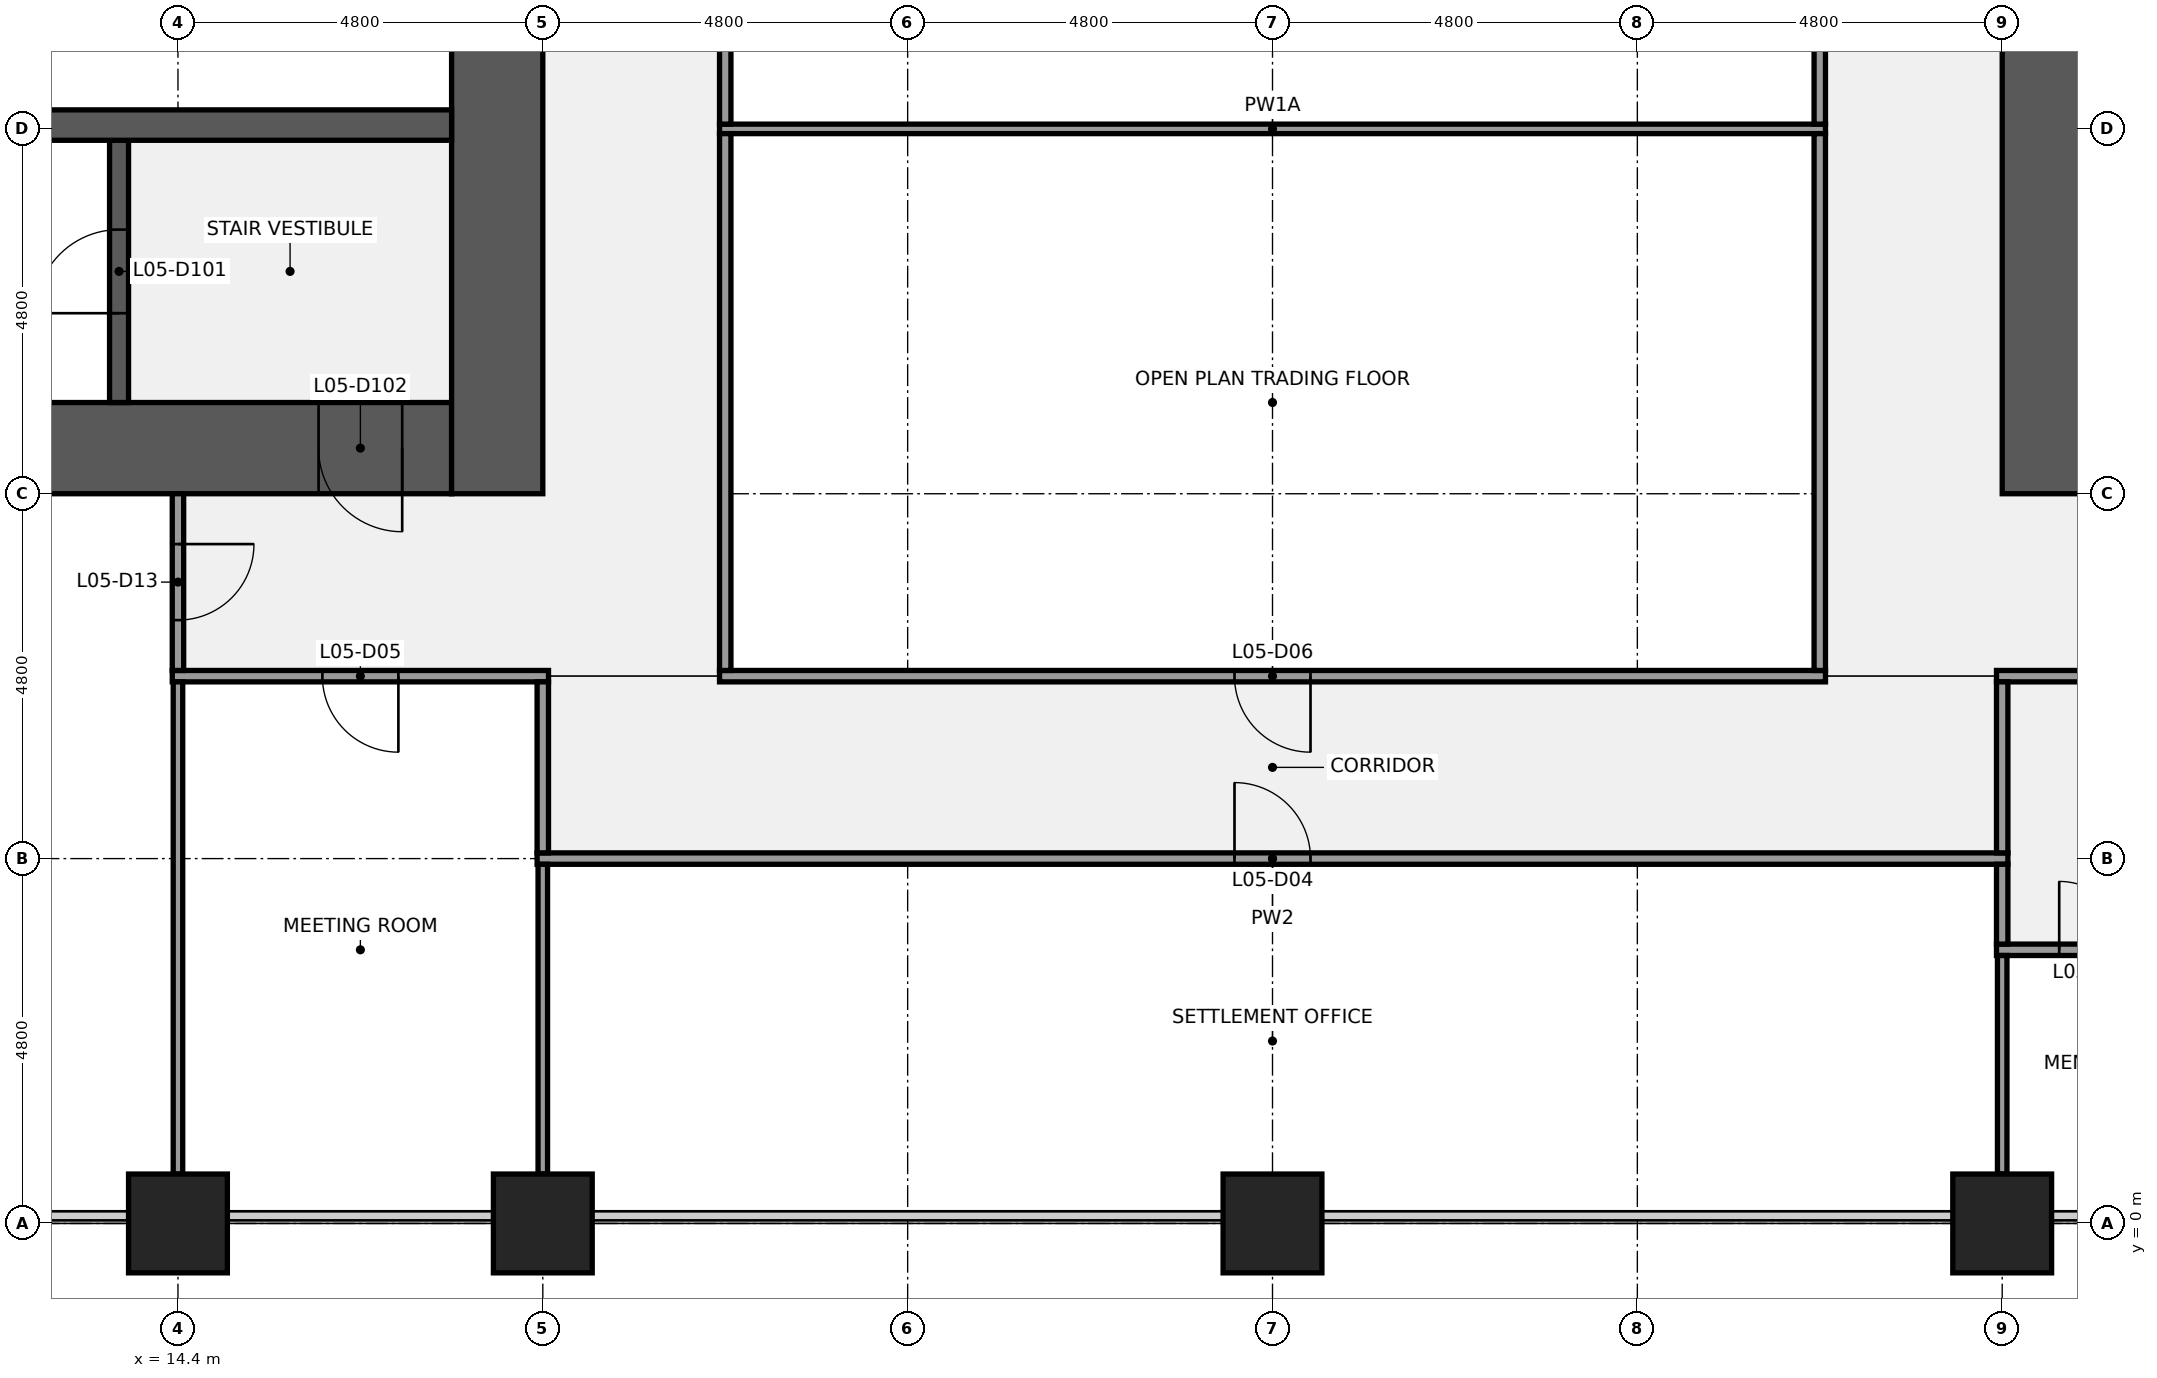
"""IFC4 building model, lengths in metres.
Left out: names, types, materials, properties, quantities, classifications, styles, units other than length and angle.
Written with IfcOpenShell. Run it as: python <this file> out.ifc"""

import sys

from ifc_helpers import new_model, si_unit, direction, frame, frame_2d, origin, origin_2d, place, context, subcontext, project, spatial, rectangle, extrude, element, fill, save


model = new_model("IFC4")
c1 = context("Model", 3, precision=1e-05, world=origin(), true_north=direction((0.0, 1.0)))
c2 = subcontext(c1, "Body", "Model", "MODEL_VIEW")
j1 = project(units=[si_unit("LENGTHUNIT", "METRE"), si_unit("PLANEANGLEUNIT", "RADIAN")], contexts=[c1])
p1 = place(None, origin())
s1 = spatial("IfcSite", under=j1, at=p1, CompositionType="ELEMENT")
p2 = place(p1, origin())
s2 = spatial("IfcBuilding", under=s1, at=p2, CompositionType="ELEMENT")
p3 = place(p2, frame((0.0, 0.0, 30.2)))
s3 = spatial("IfcBuildingStorey", under=s2, at=p3, CompositionType="ELEMENT", Elevation=30.2)
for number, where, z_axis, x_axis in (
    (1, (14.4, 0.0, 0.0), (0.0, 0.0, 1.0), (1.0, 0.0, 0.0)),
    (2, (19.2, 0.0, 0.0), (0.0, 0.0, 1.0), (1.0, 0.0, 0.0)),
    (3, (28.8, 0.0, 0.0), (0.0, 0.0, 1.0), (1.0, 0.0, 0.0)),
    (4, (38.4, 0.0, 0.0), (0.0, 0.0, 1.0), (1.0, 0.0, 0.0)),
):
    element("IfcColumn", number, at=place(p3, frame(where, z_axis=z_axis, x_axis=x_axis)), inside=s3, PredefinedType="COLUMN", context=c2, shape_type="SweptSolid", body=[
        extrude(rectangle(XDim=1.3, YDim=1.3, at=origin_2d()), origin(), (0.0, 0.0, 1.0), 4.4),
    ])
p4 = place(p3, frame((18.0, 10.2, 0.0), z_axis=(0.0, 0.0, 1.0), x_axis=(-1.0, 0.0, 0.0)))
e5 = element("IfcWall", 5, at=p4, inside=s3, PredefinedType="SHEAR", context=c2, shape_type="SweptSolid", body=[
    extrude(rectangle(XDim=13.2, YDim=1.2, at=frame_2d((6.6, 0.0))), origin(), (0.0, 0.0, 1.0), 4.24),
])
p5 = place(p4, frame((0.65, 0.0, 0.0)))
e6 = element("IfcOpeningElement", 6, at=p5, cuts=e5, PredefinedType="OPENING", context=c2, shape_type="SweptSolid", body=[
    extrude(rectangle(XDim=1.1, YDim=2.1, at=frame_2d((0.55, 1.05))), frame((0.0, 0.61, 0.0), z_axis=(0.0, -1.0, 0.0), x_axis=(1.0, 0.0, 0.0)), (0.0, 0.0, 1.0), 1.22),
])
p6 = place(p3, frame((18.6, 38.4, 0.0), z_axis=(0.0, 0.0, 1.0), x_axis=(0.0, -1.0, 0.0)))
e7 = element("IfcWall", 7, at=p6, inside=s3, PredefinedType="SHEAR", context=c2, shape_type="SweptSolid", body=[
    extrude(rectangle(XDim=28.8, YDim=1.2, at=frame_2d((14.4, 0.0))), origin(), (0.0, 0.0, 1.0), 4.24),
])
p7 = place(p6, frame((18.3, 0.0, 0.0)))
e8 = element("IfcOpeningElement", 8, at=p7, cuts=e7, PredefinedType="OPENING", context=c2, shape_type="SweptSolid", body=[
    extrude(rectangle(XDim=1.8, YDim=2.1, at=frame_2d((0.9, 1.05))), frame((0.0, 0.61, 0.0), z_axis=(0.0, -1.0, 0.0), x_axis=(1.0, 0.0, 0.0)), (0.0, 0.0, 1.0), 1.22),
])
p8 = place(p6, frame((8.7, 0.0, 0.0)))
e9 = element("IfcOpeningElement", 9, at=p8, cuts=e7, PredefinedType="OPENING", context=c2, shape_type="SweptSolid", body=[
    extrude(rectangle(XDim=1.8, YDim=2.1, at=frame_2d((0.9, 1.05))), frame((0.0, 0.61, 0.0), z_axis=(0.0, -1.0, 0.0), x_axis=(1.0, 0.0, 0.0)), (0.0, 0.0, 1.0), 1.22),
])
p9 = place(p3, frame((13.625, 10.8, 0.0), z_axis=(0.0, 0.0, 1.0), x_axis=(0.0, 1.0, 0.0)))
e10 = element("IfcWall", 10, at=p9, inside=s3, PredefinedType="SHEAR", context=c2, shape_type="SweptSolid", body=[
    extrude(rectangle(XDim=3.45, YDim=0.25, at=frame_2d((1.725, 0.0))), origin(), (0.0, 0.0, 1.0), 4.24),
])
p10 = place(p9, frame((1.175, 0.0, 0.0)))
e11 = element("IfcOpeningElement", 11, at=p10, cuts=e10, PredefinedType="OPENING", context=c2, shape_type="SweptSolid", body=[
    extrude(rectangle(XDim=1.1, YDim=2.1, at=frame_2d((0.55, 1.05))), frame((0.0, 0.135, 0.0), z_axis=(0.0, -1.0, 0.0), x_axis=(1.0, 0.0, 0.0)), (0.0, 0.0, 1.0), 0.27),
])
p11 = place(p3, frame((1.2, 14.45, 0.0), z_axis=(0.0, 0.0, 1.0), x_axis=(1.0, 0.0, 0.0)))
e12 = element("IfcWall", 12, at=p11, inside=s3, PredefinedType="SHEAR", context=c2, shape_type="SweptSolid", body=[
    extrude(rectangle(XDim=16.8, YDim=0.4, at=frame_2d((8.4, 0.0))), origin(), (0.0, 0.0, 1.0), 4.24),
])
p12 = place(p3, frame((39.0, 9.6, 0.0), z_axis=(0.0, 0.0, 1.0), x_axis=(0.0, 1.0, 0.0)))
e13 = element("IfcWall", 13, at=p12, inside=s3, PredefinedType="SHEAR", context=c2, shape_type="SweptSolid", body=[
    extrude(rectangle(XDim=28.8, YDim=1.2, at=frame_2d((14.4, 0.0))), origin(), (0.0, 0.0, 1.0), 4.24),
])
p13 = place(p12, frame((8.7, 0.0, 0.0)))
e14 = element("IfcOpeningElement", 14, at=p13, cuts=e13, PredefinedType="OPENING", context=c2, shape_type="SweptSolid", body=[
    extrude(rectangle(XDim=1.8, YDim=2.1, at=frame_2d((0.9, 1.05))), frame((0.0, 0.61, 0.0), z_axis=(0.0, -1.0, 0.0), x_axis=(1.0, 0.0, 0.0)), (0.0, 0.0, 1.0), 1.22),
])
p14 = place(p12, frame((18.3, 0.0, 0.0)))
e15 = element("IfcOpeningElement", 15, at=p14, cuts=e13, PredefinedType="OPENING", context=c2, shape_type="SweptSolid", body=[
    extrude(rectangle(XDim=1.8, YDim=2.1, at=frame_2d((0.9, 1.05))), frame((0.0, 0.61, 0.0), z_axis=(0.0, -1.0, 0.0), x_axis=(1.0, 0.0, 0.0)), (0.0, 0.0, 1.0), 1.22),
])
p15 = place(p3, frame((38.325, 3.6, 0.0), z_axis=(0.0, 0.0, 1.0), x_axis=(1.0, 0.0, 0.0)))
e16 = element("IfcWall", 16, at=p15, inside=s3, PredefinedType="PARTITIONING", context=c2, shape_type="SweptSolid", body=[
    extrude(rectangle(XDim=7.35, YDim=0.15, at=frame_2d((3.675, 0.0))), origin(), (0.0, 0.0, 1.0), 3.25),
])
p16 = place(p15, frame((0.825, 0.0, 0.0)))
e17 = element("IfcOpeningElement", 17, at=p16, cuts=e16, PredefinedType="OPENING", context=c2, shape_type="SweptSolid", body=[
    extrude(rectangle(XDim=0.9, YDim=2.1, at=frame_2d((0.45, 1.05))), frame((0.0, 0.085, 0.0), z_axis=(0.0, -1.0, 0.0), x_axis=(1.0, 0.0, 0.0)), (0.0, 0.0, 1.0), 0.17),
])
p17 = place(p15, frame((3.225, 0.0, 0.0)))
e18 = element("IfcOpeningElement", 18, at=p17, cuts=e16, PredefinedType="OPENING", context=c2, shape_type="SweptSolid", body=[
    extrude(rectangle(XDim=0.9, YDim=2.1, at=frame_2d((0.45, 1.05))), frame((0.0, 0.085, 0.0), z_axis=(0.0, -1.0, 0.0), x_axis=(1.0, 0.0, 0.0)), (0.0, 0.0, 1.0), 0.17),
])
p18 = place(p15, frame((5.475, 0.0, 0.0)))
e19 = element("IfcOpeningElement", 19, at=p18, cuts=e16, PredefinedType="OPENING", context=c2, shape_type="SweptSolid", body=[
    extrude(rectangle(XDim=1.2, YDim=2.1, at=frame_2d((0.6, 1.05))), frame((0.0, 0.085, 0.0), z_axis=(0.0, -1.0, 0.0), x_axis=(1.0, 0.0, 0.0)), (0.0, 0.0, 1.0), 0.17),
])
p19 = place(p3, frame((19.125, 4.8, 0.0), z_axis=(0.0, 0.0, 1.0), x_axis=(1.0, 0.0, 0.0)))
e20 = element("IfcWall", 20, at=p19, inside=s3, PredefinedType="PARTITIONING", context=c2, shape_type="SweptSolid", body=[
    extrude(rectangle(XDim=19.35, YDim=0.15, at=frame_2d((9.675, 0.0))), origin(), (0.0, 0.0, 1.0), 3.25),
])
p20 = place(p19, frame((9.175, 0.0, 0.0)))
e21 = element("IfcOpeningElement", 21, at=p20, cuts=e20, PredefinedType="OPENING", context=c2, shape_type="SweptSolid", body=[
    extrude(rectangle(XDim=1.0, YDim=2.1, at=frame_2d((0.5, 1.05))), frame((0.0, 0.085, 0.0), z_axis=(0.0, -1.0, 0.0), x_axis=(1.0, 0.0, 0.0)), (0.0, 0.0, 1.0), 0.17),
])
p21 = place(p3, frame((14.325, 7.2, 0.0), z_axis=(0.0, 0.0, 1.0), x_axis=(1.0, 0.0, 0.0)))
e22 = element("IfcWall", 22, at=p21, inside=s3, PredefinedType="PARTITIONING", context=c2, shape_type="SweptSolid", body=[
    extrude(rectangle(XDim=4.95, YDim=0.15, at=frame_2d((2.475, 0.0))), origin(), (0.0, 0.0, 1.0), 3.25),
])
p22 = place(p21, frame((1.975, 0.0, 0.0)))
e23 = element("IfcOpeningElement", 23, at=p22, cuts=e22, PredefinedType="OPENING", context=c2, shape_type="SweptSolid", body=[
    extrude(rectangle(XDim=1.0, YDim=2.1, at=frame_2d((0.5, 1.05))), frame((0.0, 0.085, 0.0), z_axis=(0.0, -1.0, 0.0), x_axis=(1.0, 0.0, 0.0)), (0.0, 0.0, 1.0), 0.17),
])
p23 = place(p3, frame((21.525, 7.2, 0.0), z_axis=(0.0, 0.0, 1.0), x_axis=(1.0, 0.0, 0.0)))
e24 = element("IfcWall", 24, at=p23, inside=s3, PredefinedType="PARTITIONING", context=c2, shape_type="SweptSolid", body=[
    extrude(rectangle(XDim=14.55, YDim=0.15, at=frame_2d((7.275, 0.0))), origin(), (0.0, 0.0, 1.0), 3.25),
])
p24 = place(p23, frame((6.775, 0.0, 0.0)))
e25 = element("IfcOpeningElement", 25, at=p24, cuts=e24, PredefinedType="OPENING", context=c2, shape_type="SweptSolid", body=[
    extrude(rectangle(XDim=1.0, YDim=2.1, at=frame_2d((0.5, 1.05))), frame((0.0, 0.085, 0.0), z_axis=(0.0, -1.0, 0.0), x_axis=(1.0, 0.0, 0.0)), (0.0, 0.0, 1.0), 0.17),
])
p25 = place(p3, frame((38.325, 7.2, 0.0), z_axis=(0.0, 0.0, 1.0), x_axis=(1.0, 0.0, 0.0)))
e26 = element("IfcWall", 26, at=p25, inside=s3, PredefinedType="PARTITIONING", context=c2, shape_type="SweptSolid", body=[
    extrude(rectangle(XDim=7.35, YDim=0.15, at=frame_2d((3.675, 0.0))), origin(), (0.0, 0.0, 1.0), 3.25),
])
p26 = place(p25, frame((1.975, 0.0, 0.0)))
e27 = element("IfcOpeningElement", 27, at=p26, cuts=e26, PredefinedType="OPENING", context=c2, shape_type="SweptSolid", body=[
    extrude(rectangle(XDim=1.0, YDim=2.1, at=frame_2d((0.5, 1.05))), frame((0.0, 0.085, 0.0), z_axis=(0.0, -1.0, 0.0), x_axis=(1.0, 0.0, 0.0)), (0.0, 0.0, 1.0), 0.17),
])
p27 = place(p3, frame((21.525, 14.4, 0.0), z_axis=(0.0, 0.0, 1.0), x_axis=(1.0, 0.0, 0.0)))
e28 = element("IfcWall", 28, at=p27, inside=s3, PredefinedType="PARTITIONING", context=c2, shape_type="SweptSolid", body=[
    extrude(rectangle(XDim=14.55, YDim=0.125, at=frame_2d((7.275, 0.0))), origin(), (0.0, 0.0, 1.0), 3.25),
])
p28 = place(p3, frame((14.4, 0.65, 0.0), z_axis=(0.0, 0.0, 1.0), x_axis=(0.0, 1.0, 0.0)))
e29 = element("IfcWall", 29, at=p28, inside=s3, PredefinedType="PARTITIONING", context=c2, shape_type="SweptSolid", body=[
    extrude(rectangle(XDim=6.475, YDim=0.125, at=frame_2d((3.238, 0.0))), origin(), (0.0, 0.0, 1.0), 3.25),
])
p29 = place(p3, frame((14.4, 7.275, 0.0), z_axis=(0.0, 0.0, 1.0), x_axis=(0.0, 1.0, 0.0)))
e30 = element("IfcWall", 30, at=p29, inside=s3, PredefinedType="PARTITIONING", context=c2, shape_type="SweptSolid", body=[
    extrude(rectangle(XDim=2.325, YDim=0.15, at=frame_2d((1.163, 0.0))), origin(), (0.0, 0.0, 1.0), 3.25),
])
p30 = place(p29, frame((0.663, 0.0, 0.0)))
e31 = element("IfcOpeningElement", 31, at=p30, cuts=e30, PredefinedType="OPENING", context=c2, shape_type="SweptSolid", body=[
    extrude(rectangle(XDim=1.0, YDim=2.1, at=frame_2d((0.5, 1.05))), frame((0.0, 0.085, 0.0), z_axis=(0.0, -1.0, 0.0), x_axis=(1.0, 0.0, 0.0)), (0.0, 0.0, 1.0), 0.17),
])
p31 = place(p3, frame((19.2, 0.65, 0.0), z_axis=(0.0, 0.0, 1.0), x_axis=(0.0, 1.0, 0.0)))
e32 = element("IfcWall", 32, at=p31, inside=s3, PredefinedType="PARTITIONING", context=c2, shape_type="SweptSolid", body=[
    extrude(rectangle(XDim=4.075, YDim=0.125, at=frame_2d((2.038, 0.0))), origin(), (0.0, 0.0, 1.0), 3.25),
])
p32 = place(p3, frame((19.2, 4.875, 0.0), z_axis=(0.0, 0.0, 1.0), x_axis=(0.0, 1.0, 0.0)))
e33 = element("IfcWall", 33, at=p32, inside=s3, PredefinedType="PARTITIONING", context=c2, shape_type="SweptSolid", body=[
    extrude(rectangle(XDim=2.25, YDim=0.15, at=frame_2d((1.125, 0.0))), origin(), (0.0, 0.0, 1.0), 3.25),
])
p33 = place(p3, frame((21.6, 7.275, 0.0), z_axis=(0.0, 0.0, 1.0), x_axis=(0.0, 1.0, 0.0)))
e34 = element("IfcWall", 34, at=p33, inside=s3, PredefinedType="PARTITIONING", context=c2, shape_type="SweptSolid", body=[
    extrude(rectangle(XDim=7.062, YDim=0.15, at=frame_2d((3.531, 0.0))), origin(), (0.0, 0.0, 1.0), 3.25),
])
p34 = place(p3, frame((21.6, 14.462, 0.0), z_axis=(0.0, 0.0, 1.0), x_axis=(0.0, 1.0, 0.0)))
e35 = element("IfcWall", 35, at=p34, inside=s3, PredefinedType="PARTITIONING", context=c2, shape_type="SweptSolid", body=[
    extrude(rectangle(XDim=9.475, YDim=0.15, at=frame_2d((4.738, 0.0))), origin(), (0.0, 0.0, 1.0), 3.25),
])
p35 = place(p34, frame((4.238, 0.0, 0.0)))
e36 = element("IfcOpeningElement", 36, at=p35, cuts=e35, PredefinedType="OPENING", context=c2, shape_type="SweptSolid", body=[
    extrude(rectangle(XDim=1.0, YDim=2.1, at=frame_2d((0.5, 1.05))), frame((0.0, 0.085, 0.0), z_axis=(0.0, -1.0, 0.0), x_axis=(1.0, 0.0, 0.0)), (0.0, 0.0, 1.0), 0.17),
])
p36 = place(p3, frame((36.0, 7.275, 0.0), z_axis=(0.0, 0.0, 1.0), x_axis=(0.0, 1.0, 0.0)))
e37 = element("IfcWall", 37, at=p36, inside=s3, PredefinedType="PARTITIONING", context=c2, shape_type="SweptSolid", body=[
    extrude(rectangle(XDim=7.062, YDim=0.15, at=frame_2d((3.531, 0.0))), origin(), (0.0, 0.0, 1.0), 3.25),
])
p37 = place(p3, frame((36.0, 14.462, 0.0), z_axis=(0.0, 0.0, 1.0), x_axis=(0.0, 1.0, 0.0)))
e38 = element("IfcWall", 38, at=p37, inside=s3, PredefinedType="PARTITIONING", context=c2, shape_type="SweptSolid", body=[
    extrude(rectangle(XDim=9.475, YDim=0.15, at=frame_2d((4.738, 0.0))), origin(), (0.0, 0.0, 1.0), 3.25),
])
p38 = place(p3, frame((38.4, 0.65, 0.0), z_axis=(0.0, 0.0, 1.0), x_axis=(0.0, 1.0, 0.0)))
e39 = element("IfcWall", 39, at=p38, inside=s3, PredefinedType="PARTITIONING", context=c2, shape_type="SweptSolid", body=[
    extrude(rectangle(XDim=2.875, YDim=0.125, at=frame_2d((1.438, 0.0))), origin(), (0.0, 0.0, 1.0), 3.25),
])
p39 = place(p3, frame((38.4, 3.675, 0.0), z_axis=(0.0, 0.0, 1.0), x_axis=(0.0, 1.0, 0.0)))
e40 = element("IfcWall", 40, at=p39, inside=s3, PredefinedType="PARTITIONING", context=c2, shape_type="SweptSolid", body=[
    extrude(rectangle(XDim=1.05, YDim=0.15, at=frame_2d((0.525, 0.0))), origin(), (0.0, 0.0, 1.0), 3.25),
])
p40 = place(p3, frame((38.4, 4.875, 0.0), z_axis=(0.0, 0.0, 1.0), x_axis=(0.0, 1.0, 0.0)))
e41 = element("IfcWall", 41, at=p40, inside=s3, PredefinedType="PARTITIONING", context=c2, shape_type="SweptSolid", body=[
    extrude(rectangle(XDim=2.25, YDim=0.15, at=frame_2d((1.125, 0.0))), origin(), (0.0, 0.0, 1.0), 3.25),
])
for number, where, z_axis, x_axis in (
    (42, (14.4, -1.075, 0.0), (0.0, 0.0, 1.0), (1.0, 0.0, 0.0)),
    (43, (19.2, -1.075, 0.0), (0.0, 0.0, 1.0), (1.0, 0.0, 0.0)),
    (44, (38.4, -1.075, 0.0), (0.0, 0.0, 1.0), (1.0, 0.0, 0.0)),
):
    element("IfcColumn", number, at=place(p3, frame(where, z_axis=z_axis, x_axis=x_axis)), inside=s3, PredefinedType="PILASTER", context=c2, shape_type="SweptSolid", body=[
        extrude(rectangle(XDim=4.2, YDim=0.85, at=origin_2d()), origin(), (0.0, 0.0, 1.0), 4.4),
    ])
p41 = place(p10, origin())
e45 = element("IfcDoor", 45, at=p41, inside=s3, OperationType="SINGLE_SWING_LEFT", PredefinedType="DOOR", context=c2, shape_type="SweptSolid", body=[
    extrude(rectangle(XDim=1.1, YDim=2.1, at=frame_2d((0.55, 1.05))), frame((0.0, 0.025, 0.0), z_axis=(0.0, -1.0, 0.0), x_axis=(1.0, 0.0, 0.0)), (0.0, 0.0, 1.0), 0.05),
])
fill(e11, e45)
p42 = place(p5, origin())
e46 = element("IfcDoor", 46, at=p42, inside=s3, OperationType="SINGLE_SWING_LEFT", PredefinedType="DOOR", context=c2, shape_type="SweptSolid", body=[
    extrude(rectangle(XDim=1.1, YDim=2.1, at=frame_2d((0.55, 1.05))), frame((0.0, 0.025, 0.0), z_axis=(0.0, -1.0, 0.0), x_axis=(1.0, 0.0, 0.0)), (0.0, 0.0, 1.0), 0.05),
])
fill(e6, e46)
p43 = place(p16, origin())
e47 = element("IfcDoor", 47, at=p43, inside=s3, OperationType="SINGLE_SWING_LEFT", PredefinedType="DOOR", context=c2, shape_type="SweptSolid", body=[
    extrude(rectangle(XDim=0.9, YDim=2.1, at=frame_2d((0.45, 1.05))), frame((0.0, 0.025, 0.0), z_axis=(0.0, -1.0, 0.0), x_axis=(1.0, 0.0, 0.0)), (0.0, 0.0, 1.0), 0.05),
])
fill(e17, e47)
p44 = place(p20, origin())
e48 = element("IfcDoor", 48, at=p44, inside=s3, OperationType="SINGLE_SWING_LEFT", PredefinedType="DOOR", context=c2, shape_type="SweptSolid", body=[
    extrude(rectangle(XDim=1.0, YDim=2.1, at=frame_2d((0.5, 1.05))), frame((0.0, 0.025, 0.0), z_axis=(0.0, -1.0, 0.0), x_axis=(1.0, 0.0, 0.0)), (0.0, 0.0, 1.0), 0.05),
])
fill(e21, e48)
p45 = place(p22, origin())
e49 = element("IfcDoor", 49, at=p45, inside=s3, OperationType="SINGLE_SWING_RIGHT", PredefinedType="DOOR", context=c2, shape_type="SweptSolid", body=[
    extrude(rectangle(XDim=1.0, YDim=2.1, at=frame_2d((0.5, 1.05))), frame((0.0, 0.025, 0.0), z_axis=(0.0, -1.0, 0.0), x_axis=(1.0, 0.0, 0.0)), (0.0, 0.0, 1.0), 0.05),
])
fill(e23, e49)
p46 = place(p24, origin())
e50 = element("IfcDoor", 50, at=p46, inside=s3, OperationType="SINGLE_SWING_RIGHT", PredefinedType="DOOR", context=c2, shape_type="SweptSolid", body=[
    extrude(rectangle(XDim=1.0, YDim=2.1, at=frame_2d((0.5, 1.05))), frame((0.0, 0.025, 0.0), z_axis=(0.0, -1.0, 0.0), x_axis=(1.0, 0.0, 0.0)), (0.0, 0.0, 1.0), 0.05),
])
fill(e25, e50)
p47 = place(p30, origin())
e51 = element("IfcDoor", 51, at=p47, inside=s3, OperationType="SINGLE_SWING_RIGHT", PredefinedType="DOOR", context=c2, shape_type="SweptSolid", body=[
    extrude(rectangle(XDim=1.0, YDim=2.1, at=frame_2d((0.5, 1.05))), frame((0.0, 0.025, 0.0), z_axis=(0.0, -1.0, 0.0), x_axis=(1.0, 0.0, 0.0)), (0.0, 0.0, 1.0), 0.05),
])
fill(e31, e51)
save(model, sys.argv[1])
